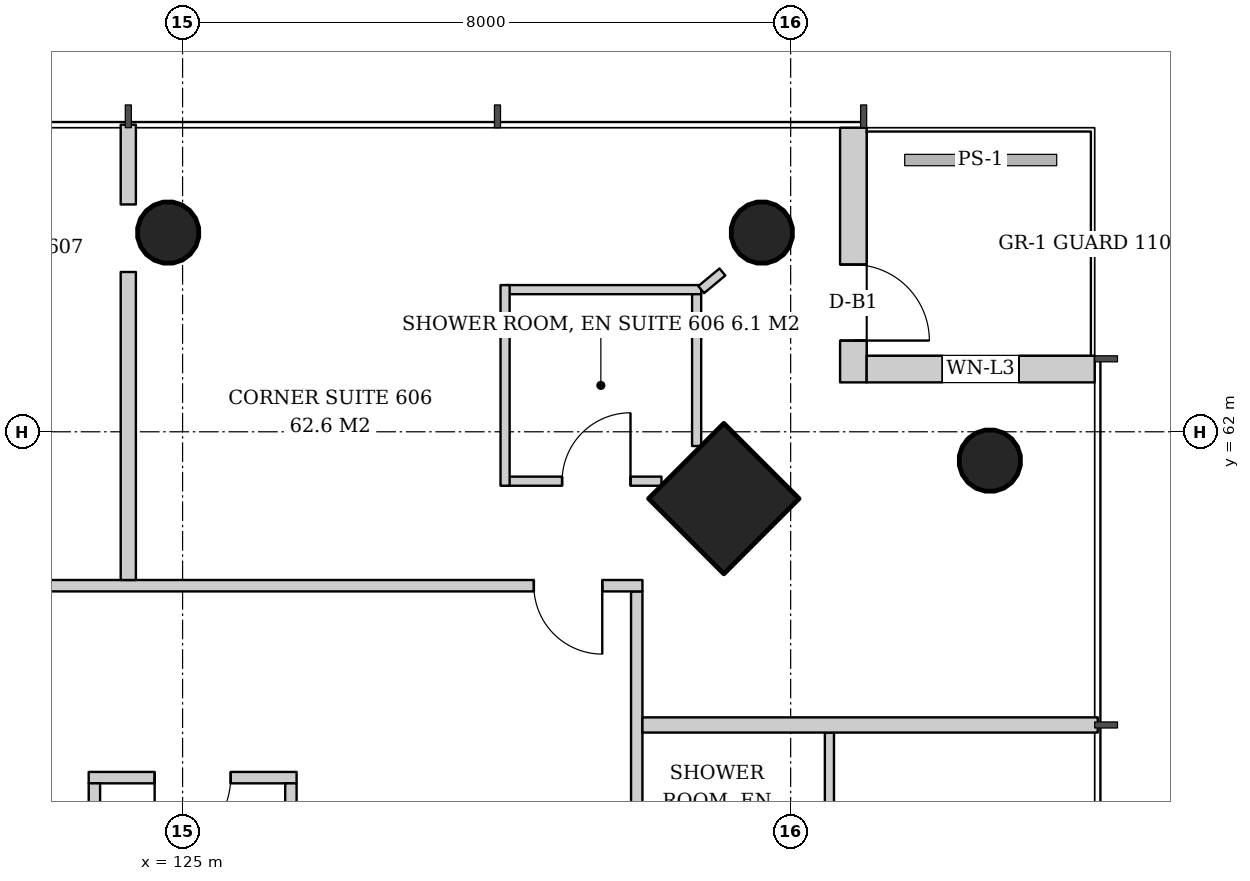
"""IFC4 building model, lengths in metres.
Left out: names, types, materials, properties, quantities, classifications, styles, units other than length and angle.
Written with IfcOpenShell. Run it as: python <this file> out.ifc"""

import sys

from ifc_helpers import new_model, si_unit, direction, frame, frame_2d, origin, origin_2d, place, context, subcontext, project, spatial, rectangle, hollow_circle, extrude, element, fill, save


model = new_model("IFC4")
c1 = context("Model", 3, precision=1e-05, world=origin(), true_north=direction((0.0, 1.0)))
c2 = subcontext(c1, "Body", "Model", "MODEL_VIEW")
j1 = project(units=[si_unit("LENGTHUNIT", "METRE"), si_unit("PLANEANGLEUNIT", "RADIAN")], contexts=[c1])
p1 = place(None, origin())
s1 = spatial("IfcSite", under=j1, at=p1, CompositionType="ELEMENT")
p2 = place(p1, origin())
s2 = spatial("IfcBuilding", under=s1, at=p2, CompositionType="ELEMENT")
p3 = place(p2, frame((0.0, 0.0, 28.6)))
s3 = spatial("IfcBuildingStorey", under=s2, at=p3, CompositionType="ELEMENT", Elevation=28.6)
p4 = place(p3, frame((132.172, 61.172, 0.0), z_axis=(-0.043032401563, -0.043032401563, 0.998146494675), x_axis=(0.707106781187, -0.707106781187, 0.0)))
e1 = element("IfcColumn", 1, at=p4, inside=s3, PredefinedType="COLUMN", context=c2, shape_type="SweptSolid", body=[
    extrude(rectangle(XDim=1.4, YDim=1.4, at=origin_2d()), origin(), (0.0, 0.0, 1.0), 3.807),
])
for number, where, z_axis, x_axis in (
    (2, (135.672, 61.672, 0.0), (-0.043, -0.043, 0.998), (0.707, -0.707, 0.0)),
    (3, (132.672, 64.672, 0.0), (-0.043, -0.043, 0.998), (0.707, -0.707, 0.0)),
):
    element("IfcColumn", number, at=place(p3, frame(where, z_axis=z_axis, x_axis=x_axis)), inside=s3, PredefinedType="COLUMN", context=c2, shape_type="SweptSolid", body=[
        extrude(hollow_circle(Radius=0.406, WallThickness=0.03, at=origin_2d()), origin(), (0.0, 0.0, 1.0), 3.807),
    ])
p5 = place(p3, frame((124.836, 64.672, 0.0), z_axis=(-0.02149908433, -0.04306234503, 0.998841040313), x_axis=(0.894693706707, -0.446680166538, 0.0)))
e4 = element("IfcColumn", 4, at=p5, inside=s3, PredefinedType="COLUMN", context=c2, shape_type="SweptSolid", body=[
    extrude(hollow_circle(Radius=0.406, WallThickness=0.03, at=origin_2d()), origin(), (0.0, 0.0, 1.0), 3.804),
])
p6 = place(p3, frame((133.825, 66.0, 0.0), z_axis=(0.0, 0.0, 1.0), x_axis=(0.0, -1.0, 0.0)))
e5 = element("IfcWall", 5, at=p6, inside=s3, PredefinedType="SOLIDWALL", context=c2, shape_type="SweptSolid", body=[
    extrude(rectangle(XDim=3.35, YDim=0.35, at=frame_2d((1.675, 0.0))), origin(), (0.0, 0.0, 1.0), 3.6),
])
p7 = place(p6, frame((1.8, 0.0, 0.0)))
e6 = element("IfcOpeningElement", 6, at=p7, cuts=e5, PredefinedType="OPENING", context=c2, shape_type="SweptSolid", body=[
    extrude(rectangle(XDim=1.0, YDim=2.4, at=frame_2d((0.5, 1.2))), frame((0.0, 0.185, 0.0), z_axis=(0.0, -1.0, 0.0), x_axis=(1.0, 0.0, 0.0)), (0.0, 0.0, 1.0), 0.37),
])
p8 = place(p3, frame((134.0, 62.825, 0.0), z_axis=(0.0, 0.0, 1.0), x_axis=(1.0, 0.0, 0.0)))
e7 = element("IfcWall", 7, at=p8, inside=s3, PredefinedType="SOLIDWALL", context=c2, shape_type="SweptSolid", body=[
    extrude(rectangle(XDim=3.0, YDim=0.35, at=frame_2d((1.5, 0.0))), origin(), (0.0, 0.0, 1.0), 3.6),
])
p9 = place(p8, frame((1.0, 0.0, 0.9)))
e8 = element("IfcOpeningElement", 8, at=p9, cuts=e7, PredefinedType="OPENING", context=c2, shape_type="SweptSolid", body=[
    extrude(rectangle(XDim=1.0, YDim=2.4, at=frame_2d((0.5, 1.2))), frame((0.0, 0.185, 0.0), z_axis=(0.0, -1.0, 0.0), x_axis=(1.0, 0.0, 0.0)), (0.0, 0.0, 1.0), 0.37),
])
p10 = place(p3, frame((126.5, 57.45, 0.0), z_axis=(0.0, 0.0, 1.0), x_axis=(-1.0, 0.0, 0.0)))
e9 = element("IfcWall", 9, at=p10, inside=s3, PredefinedType="PARTITIONING", context=c2, shape_type="SweptSolid", body=[
    extrude(rectangle(XDim=2.735, YDim=0.15, at=frame_2d((1.368, 0.0))), origin(), (0.0, 0.0, 1.0), 2.8),
])
p11 = place(p10, frame((0.867, 0.0, 0.0)))
e10 = element("IfcOpeningElement", 10, at=p11, cuts=e9, PredefinedType="OPENING", context=c2, shape_type="SweptSolid", body=[
    extrude(rectangle(XDim=1.0, YDim=2.1, at=frame_2d((0.5, 1.05))), frame((0.0, 0.085, 0.0), z_axis=(0.0, -1.0, 0.0), x_axis=(1.0, 0.0, 0.0)), (0.0, 0.0, 1.0), 0.17),
])
p12 = place(p3, frame((126.425, 55.5, 0.0), z_axis=(0.0, 0.0, 1.0), x_axis=(0.0, 1.0, 0.0)))
e11 = element("IfcWall", 11, at=p12, inside=s3, PredefinedType="PARTITIONING", context=c2, shape_type="SweptSolid", body=[
    extrude(rectangle(XDim=1.875, YDim=0.15, at=frame_2d((0.938, 0.0))), origin(), (0.0, 0.0, 1.0), 2.8),
])
p13 = place(p3, frame((123.84, 55.5, 0.0), z_axis=(0.0, 0.0, 1.0), x_axis=(0.0, 1.0, 0.0)))
e12 = element("IfcWall", 12, at=p13, inside=s3, PredefinedType="PARTITIONING", context=c2, shape_type="SweptSolid", body=[
    extrude(rectangle(XDim=1.875, YDim=0.15, at=frame_2d((0.938, 0.0))), origin(), (0.0, 0.0, 1.0), 3.6),
])
p14 = place(p3, frame((133.51, 55.623, 0.0), z_axis=(0.0, 0.0, 1.0), x_axis=(0.0, 1.0, 0.0)))
e13 = element("IfcWall", 13, at=p14, inside=s3, PredefinedType="PARTITIONING", context=c2, shape_type="SweptSolid", body=[
    extrude(rectangle(XDim=2.42, YDim=0.12, at=frame_2d((1.21, 0.0))), origin(), (0.0, 0.0, 1.0), 2.847),
])
p15 = place(p3, frame((130.975, 31.95, 0.0), z_axis=(0.0, 0.0, 1.0), x_axis=(0.0, 1.0, 0.0)))
e14 = element("IfcWall", 14, at=p15, inside=s3, PredefinedType="PARTITIONING", context=c2, shape_type="SweptSolid", body=[
    extrude(rectangle(XDim=27.95, YDim=0.15, at=frame_2d((13.975, 0.0))), origin(), (0.0, 0.0, 1.0), 2.8),
])
p16 = place(p15, frame((0.529, 0.0, 0.0)))
e15 = element("IfcOpeningElement", 15, at=p16, cuts=e14, PredefinedType="OPENING", context=c2, shape_type="SweptSolid", body=[
    extrude(rectangle(XDim=0.9, YDim=2.1, at=frame_2d((0.45, 1.05))), frame((0.0, 0.085, 0.0), z_axis=(0.0, -1.0, 0.0), x_axis=(1.0, 0.0, 0.0)), (0.0, 0.0, 1.0), 0.17),
])
p17 = place(p15, frame((4.657, 0.0, 0.0)))
e16 = element("IfcOpeningElement", 16, at=p17, cuts=e14, PredefinedType="OPENING", context=c2, shape_type="SweptSolid", body=[
    extrude(rectangle(XDim=0.9, YDim=2.1, at=frame_2d((0.45, 1.05))), frame((0.0, 0.085, 0.0), z_axis=(0.0, -1.0, 0.0), x_axis=(1.0, 0.0, 0.0)), (0.0, 0.0, 1.0), 0.17),
])
p18 = place(p15, frame((12.579, 0.0, 0.0)))
e17 = element("IfcOpeningElement", 17, at=p18, cuts=e14, PredefinedType="OPENING", context=c2, shape_type="SweptSolid", body=[
    extrude(rectangle(XDim=0.9, YDim=2.1, at=frame_2d((0.45, 1.05))), frame((0.0, 0.085, 0.0), z_axis=(0.0, -1.0, 0.0), x_axis=(1.0, 0.0, 0.0)), (0.0, 0.0, 1.0), 0.17),
])
p19 = place(p15, frame((19.229, 0.0, 0.0)))
e18 = element("IfcOpeningElement", 18, at=p19, cuts=e14, PredefinedType="OPENING", context=c2, shape_type="SweptSolid", body=[
    extrude(rectangle(XDim=0.9, YDim=2.1, at=frame_2d((0.45, 1.05))), frame((0.0, 0.085, 0.0), z_axis=(0.0, -1.0, 0.0), x_axis=(1.0, 0.0, 0.0)), (0.0, 0.0, 1.0), 0.17),
])
p20 = place(p15, frame((22.543, 0.0, 0.0)))
e19 = element("IfcOpeningElement", 19, at=p20, cuts=e14, PredefinedType="OPENING", context=c2, shape_type="SweptSolid", body=[
    extrude(rectangle(XDim=0.9, YDim=2.1, at=frame_2d((0.45, 1.05))), frame((0.0, 0.085, 0.0), z_axis=(0.0, -1.0, 0.0), x_axis=(1.0, 0.0, 0.0)), (0.0, 0.0, 1.0), 0.17),
])
p21 = place(p3, frame((131.05, 58.143, 0.0), z_axis=(0.0, 0.0, 1.0), x_axis=(1.0, 0.0, 0.0)))
e20 = element("IfcWall", 20, at=p21, inside=s3, PredefinedType="PARTITIONING", context=c2, shape_type="SweptSolid", body=[
    extrude(rectangle(XDim=5.99, YDim=0.2, at=frame_2d((2.995, 0.0))), origin(), (0.0, 0.0, 1.0), 3.05),
])
p22 = place(p3, frame((129.243, 61.35, 0.0), z_axis=(0.0, 0.0, 1.0), x_axis=(1.0, 0.0, 0.0)))
e21 = element("IfcWall", 21, at=p22, inside=s3, PredefinedType="PARTITIONING", context=c2, shape_type="SweptSolid", body=[
    extrude(rectangle(XDim=2.057, YDim=0.12, at=frame_2d((1.029, 0.0))), origin(), (0.0, 0.0, 1.0), 3.6),
])
p23 = place(p22, frame((0.75, 0.0, 0.0)))
e22 = element("IfcOpeningElement", 22, at=p23, cuts=e21, PredefinedType="OPENING", context=c2, shape_type="SweptSolid", body=[
    extrude(rectangle(XDim=0.9, YDim=2.1, at=frame_2d((0.45, 1.05))), frame((0.0, 0.07, 0.0), z_axis=(0.0, -1.0, 0.0), x_axis=(1.0, 0.0, 0.0)), (0.0, 0.0, 1.0), 0.14),
])
p24 = place(p3, frame((129.243, 63.87, 0.0), z_axis=(0.0, 0.0, 1.0), x_axis=(1.0, 0.0, 0.0)))
e23 = element("IfcWall", 23, at=p24, inside=s3, PredefinedType="PARTITIONING", context=c2, shape_type="SweptSolid", body=[
    extrude(rectangle(XDim=2.58, YDim=0.12, at=frame_2d((1.29, 0.0))), origin(), (0.0, 0.0, 1.0), 3.6),
])
p25 = place(p3, frame((131.763, 61.813, 0.0), z_axis=(0.0, 0.0, 1.0), x_axis=(0.0, 1.0, 0.0)))
e24 = element("IfcWall", 24, at=p25, inside=s3, PredefinedType="PARTITIONING", context=c2, shape_type="SweptSolid", body=[
    extrude(rectangle(XDim=1.997, YDim=0.12, at=frame_2d((0.999, 0.0))), origin(), (0.0, 0.0, 1.0), 3.6),
])
p26 = place(p3, frame((129.243, 61.29, 0.0), z_axis=(0.0, 0.0, 1.0), x_axis=(0.0, 1.0, 0.0)))
e25 = element("IfcWall", 25, at=p26, inside=s3, PredefinedType="PARTITIONING", context=c2, shape_type="SweptSolid", body=[
    extrude(rectangle(XDim=2.64, YDim=0.12, at=frame_2d((1.32, 0.0))), origin(), (0.0, 0.0, 1.0), 3.6),
])
p27 = place(p3, frame((131.05, 59.975, 0.0), z_axis=(0.0, 0.0, 1.0), x_axis=(-1.0, 0.0, 0.0)))
e26 = element("IfcWall", 26, at=p27, inside=s3, PredefinedType="PARTITIONING", context=c2, shape_type="SweptSolid", body=[
    extrude(rectangle(XDim=27.95, YDim=0.15, at=frame_2d((13.975, 0.0))), origin(), (0.0, 0.0, 1.0), 2.8),
])
p28 = place(p27, frame((0.529, 0.0, 0.0)))
e27 = element("IfcOpeningElement", 27, at=p28, cuts=e26, PredefinedType="OPENING", context=c2, shape_type="SweptSolid", body=[
    extrude(rectangle(XDim=0.9, YDim=2.1, at=frame_2d((0.45, 1.05))), frame((0.0, 0.085, 0.0), z_axis=(0.0, -1.0, 0.0), x_axis=(1.0, 0.0, 0.0)), (0.0, 0.0, 1.0), 0.17),
])
p29 = place(p27, frame((7.971, 0.0, 0.0)))
e28 = element("IfcOpeningElement", 28, at=p29, cuts=e26, PredefinedType="OPENING", context=c2, shape_type="SweptSolid", body=[
    extrude(rectangle(XDim=0.9, YDim=2.1, at=frame_2d((0.45, 1.05))), frame((0.0, 0.085, 0.0), z_axis=(0.0, -1.0, 0.0), x_axis=(1.0, 0.0, 0.0)), (0.0, 0.0, 1.0), 0.17),
])
p30 = place(p27, frame((14.371, 0.0, 0.0)))
e29 = element("IfcOpeningElement", 29, at=p30, cuts=e26, PredefinedType="OPENING", context=c2, shape_type="SweptSolid", body=[
    extrude(rectangle(XDim=0.9, YDim=2.1, at=frame_2d((0.45, 1.05))), frame((0.0, 0.085, 0.0), z_axis=(0.0, -1.0, 0.0), x_axis=(1.0, 0.0, 0.0)), (0.0, 0.0, 1.0), 0.17),
])
p31 = place(p27, frame((17.686, 0.0, 0.0)))
e30 = element("IfcOpeningElement", 30, at=p31, cuts=e26, PredefinedType="OPENING", context=c2, shape_type="SweptSolid", body=[
    extrude(rectangle(XDim=0.9, YDim=2.1, at=frame_2d((0.45, 1.05))), frame((0.0, 0.085, 0.0), z_axis=(0.0, -1.0, 0.0), x_axis=(1.0, 0.0, 0.0)), (0.0, 0.0, 1.0), 0.17),
])
p32 = place(p27, frame((24.086, 0.0, 0.0)))
e31 = element("IfcOpeningElement", 31, at=p32, cuts=e26, PredefinedType="OPENING", context=c2, shape_type="SweptSolid", body=[
    extrude(rectangle(XDim=0.9, YDim=2.1, at=frame_2d((0.45, 1.05))), frame((0.0, 0.085, 0.0), z_axis=(0.0, -1.0, 0.0), x_axis=(1.0, 0.0, 0.0)), (0.0, 0.0, 1.0), 0.17),
])
p33 = place(p3, frame((124.286, 60.05, 0.0), z_axis=(0.0, 0.0, 1.0), x_axis=(0.0, 1.0, 0.0)))
e32 = element("IfcWall", 32, at=p33, inside=s3, PredefinedType="PARTITIONING", context=c2, shape_type="SweptSolid", body=[
    extrude(rectangle(XDim=4.052, YDim=0.2, at=frame_2d((2.026, 0.0))), origin(), (0.0, 0.0, 1.0), 3.6),
])
p34 = place(p3, frame((124.286, 64.991, 0.0), z_axis=(0.0, 0.0, 1.0), x_axis=(0.0, 1.0, 0.0)))
e33 = element("IfcWall", 33, at=p34, inside=s3, PredefinedType="PARTITIONING", context=c2, shape_type="SweptSolid", body=[
    extrude(rectangle(XDim=1.049, YDim=0.2, at=frame_2d((0.524, 0.0))), origin(), (0.0, 0.0, 1.0), 3.6),
])
p35 = place(p3, frame((131.823, 63.87, 0.0), z_axis=(0.0, 0.0, 1.0), x_axis=(0.76932257457, 0.638860529582, 0.0)))
e34 = element("IfcWall", 34, at=p35, inside=s3, PredefinedType="PARTITIONING", context=c2, shape_type="SweptSolid", body=[
    extrude(rectangle(XDim=0.363, YDim=0.12, at=frame_2d((0.182, 0.0))), origin(), (0.0, 0.0, 1.0), 3.6),
])
p36 = place(p7, origin())
e35 = element("IfcDoor", 35, at=p36, inside=s3, OperationType="SINGLE_SWING_RIGHT", PredefinedType="DOOR", context=c2, shape_type="SweptSolid", body=[
    extrude(rectangle(XDim=1.0, YDim=2.4, at=frame_2d((0.5, 1.2))), frame((0.0, 0.025, 0.0), z_axis=(0.0, -1.0, 0.0), x_axis=(1.0, 0.0, 0.0)), (0.0, 0.0, 1.0), 0.05),
])
fill(e6, e35)
p37 = place(p9, origin())
e36 = element("IfcWindow", 36, at=p37, inside=s3, PartitioningType="SINGLE_PANEL", PredefinedType="WINDOW", context=c2, shape_type="SweptSolid", body=[
    extrude(rectangle(XDim=1.0, YDim=2.4, at=frame_2d((0.5, 1.2))), frame((0.0, 0.03, 0.0), z_axis=(0.0, -1.0, 0.0), x_axis=(1.0, 0.0, 0.0)), (0.0, 0.0, 1.0), 0.06),
])
fill(e8, e36)
p38 = place(p11, origin())
e37 = element("IfcDoor", 37, at=p38, inside=s3, OperationType="SINGLE_SWING_RIGHT", PredefinedType="DOOR", context=c2, shape_type="SweptSolid", body=[
    extrude(rectangle(XDim=1.0, YDim=2.1, at=frame_2d((0.5, 1.05))), frame((0.0, 0.025, 0.0), z_axis=(0.0, -1.0, 0.0), x_axis=(1.0, 0.0, 0.0)), (0.0, 0.0, 1.0), 0.05),
])
fill(e10, e37)
p39 = place(p23, origin())
e38 = element("IfcDoor", 38, at=p39, inside=s3, OperationType="SINGLE_SWING_RIGHT", PredefinedType="DOOR", context=c2, shape_type="SweptSolid", body=[
    extrude(rectangle(XDim=0.9, YDim=2.1, at=frame_2d((0.45, 1.05))), frame((0.0, 0.025, 0.0), z_axis=(0.0, -1.0, 0.0), x_axis=(1.0, 0.0, 0.0)), (0.0, 0.0, 1.0), 0.05),
])
fill(e22, e38)
p40 = place(p28, origin())
e39 = element("IfcDoor", 39, at=p40, inside=s3, OperationType="SINGLE_SWING_LEFT", PredefinedType="DOOR", context=c2, shape_type="SweptSolid", body=[
    extrude(rectangle(XDim=0.9, YDim=2.1, at=frame_2d((0.45, 1.05))), frame((0.0, 0.025, 0.0), z_axis=(0.0, -1.0, 0.0), x_axis=(1.0, 0.0, 0.0)), (0.0, 0.0, 1.0), 0.05),
])
fill(e27, e39)
save(model, sys.argv[1])
